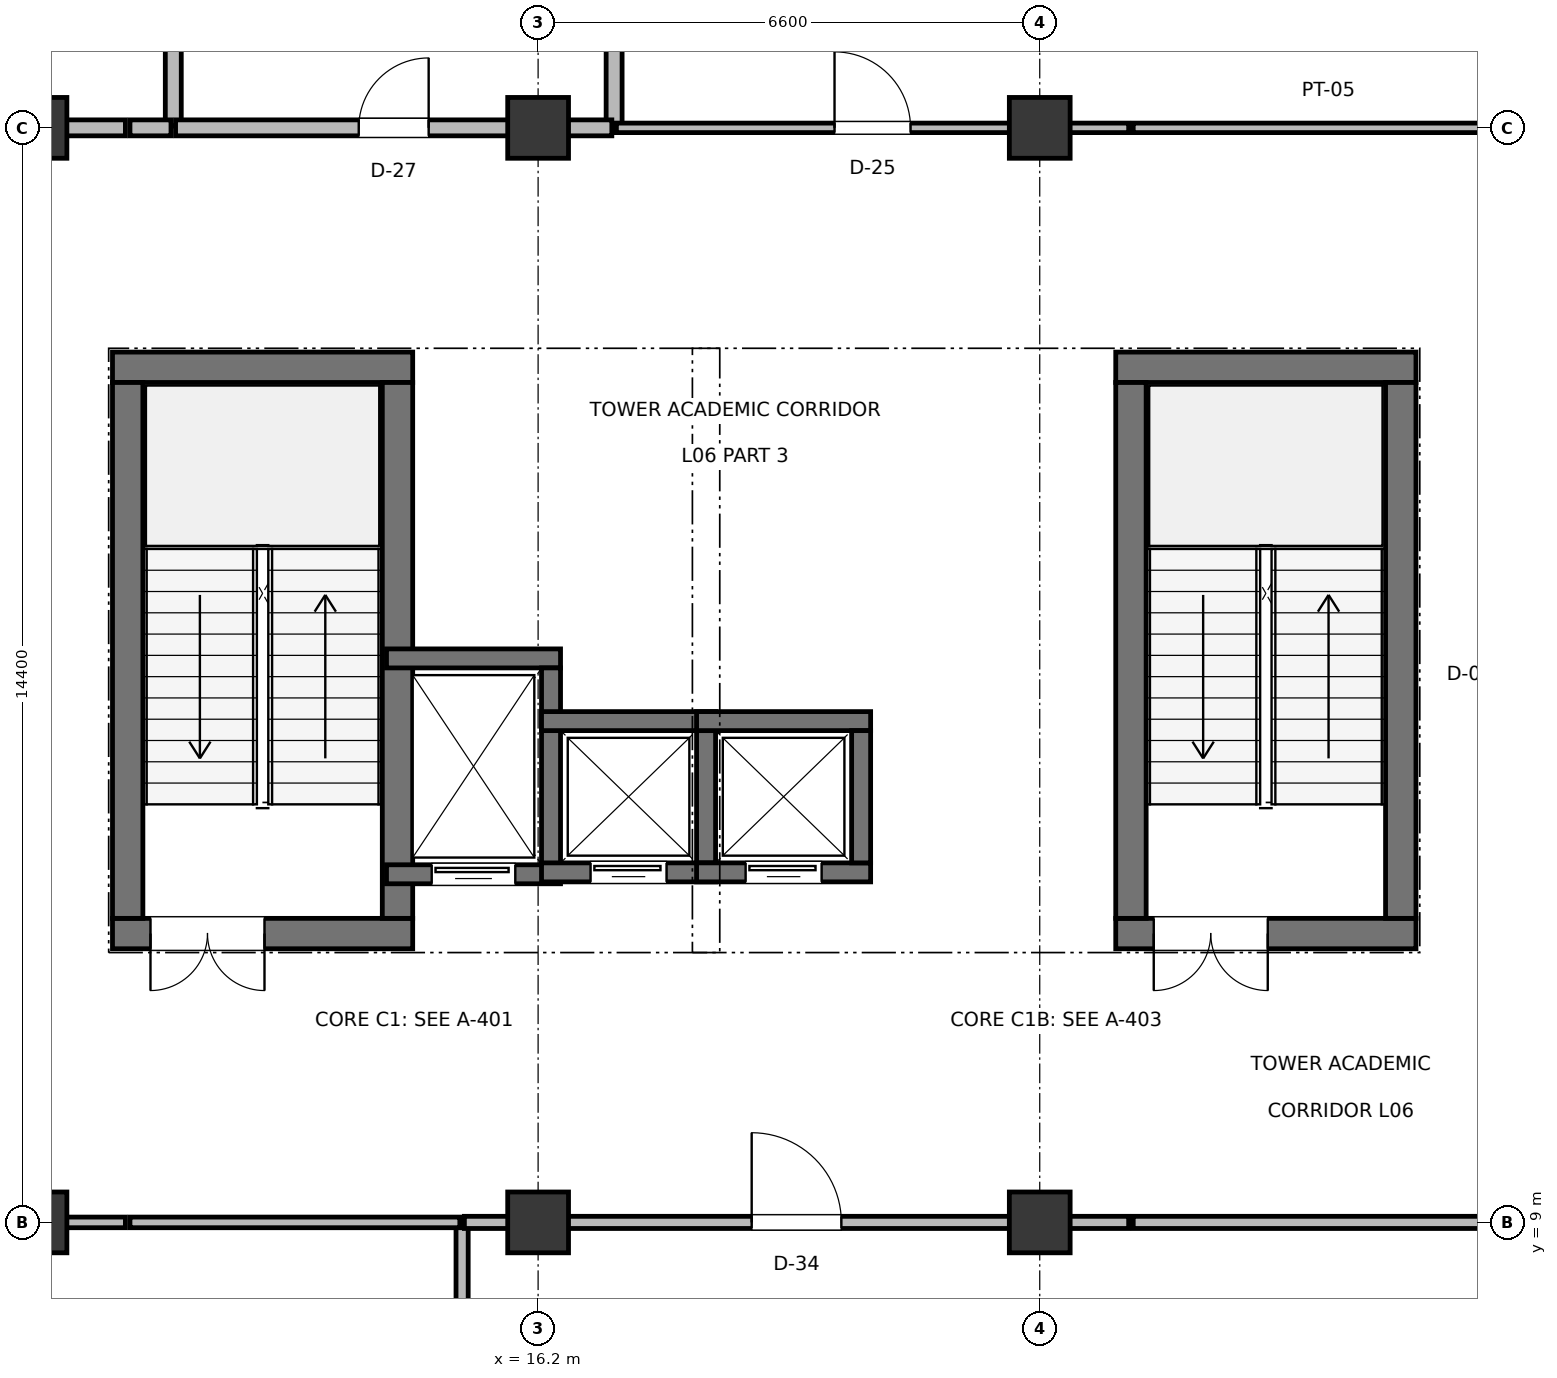
"""IFC4 building model, lengths in metres.
Left out: names, types, materials, properties, quantities, classifications, styles, units other than length and angle.
Written with IfcOpenShell. Run it as: python <this file> out.ifc"""

import sys

from ifc_helpers import new_model, si_unit, direction, frame, frame_2d, origin, origin_2d, place, context, subcontext, project, spatial, rectangle, extrude, element, fill, save


model = new_model("IFC4")
c1 = context("Model", 3, precision=1e-05, world=origin(), true_north=direction((0.0, 1.0)))
c2 = subcontext(c1, "Body", "Model", "MODEL_VIEW")
j1 = project(units=[si_unit("LENGTHUNIT", "METRE"), si_unit("PLANEANGLEUNIT", "RADIAN")], contexts=[c1])
p1 = place(None, origin())
s1 = spatial("IfcSite", under=j1, at=p1, CompositionType="ELEMENT")
p2 = place(p1, origin())
s2 = spatial("IfcBuilding", under=s1, at=p2, CompositionType="ELEMENT")
p3 = place(p2, frame((0.0, 0.0, 28.5)))
s3 = spatial("IfcBuildingStorey", under=s2, at=p3, CompositionType="ELEMENT", Elevation=28.5)
for number, where, z_axis, x_axis in (
    (1, (9.6, 9.0, 0.0), (0.0, 0.0, 1.0), (1.0, 0.0, 0.0)),
    (2, (9.6, 23.4, 0.0), (0.0, 0.0, 1.0), (1.0, 0.0, 0.0)),
    (3, (16.2, 9.0, 0.0), (0.0, 0.0, 1.0), (1.0, 0.0, 0.0)),
    (4, (16.2, 23.4, 0.0), (0.0, 0.0, 1.0), (1.0, 0.0, 0.0)),
    (5, (22.8, 9.0, 0.0), (0.0, 0.0, 1.0), (1.0, 0.0, 0.0)),
    (6, (22.8, 23.4, 0.0), (0.0, 0.0, 1.0), (1.0, 0.0, 0.0)),
):
    element("IfcColumn", number, at=place(p3, frame(where, z_axis=z_axis, x_axis=x_axis)), inside=s3, PredefinedType="COLUMN", context=c2, shape_type="SweptSolid", body=[
        extrude(rectangle(XDim=0.8, YDim=0.8, at=origin_2d()), origin(), (0.0, 0.0, 1.0), 4.5),
    ])
p4 = place(p3, frame((10.6, 12.8, 0.0), z_axis=(0.0, 0.0, 1.0), x_axis=(1.0, 0.0, 0.0)))
e7 = element("IfcWall", 7, at=p4, inside=s3, PredefinedType="SHEAR", context=c2, shape_type="SweptSolid", body=[
    extrude(rectangle(XDim=3.95, YDim=0.4, at=frame_2d((1.975, 0.0))), origin(), (0.0, 0.0, 1.0), 4.28),
])
p5 = place(p4, frame((0.5, 0.0, 0.0)))
e8 = element("IfcOpeningElement", 8, at=p5, cuts=e7, PredefinedType="OPENING", context=c2, shape_type="SweptSolid", body=[
    extrude(rectangle(XDim=1.5, YDim=2.2, at=frame_2d((0.75, 1.1))), frame((0.0, 0.21, 0.0), z_axis=(0.0, -1.0, 0.0), x_axis=(1.0, 0.0, 0.0)), (0.0, 0.0, 1.0), 0.42),
])
p6 = place(p3, frame((10.6, 20.25, 0.0), z_axis=(0.0, 0.0, 1.0), x_axis=(1.0, 0.0, 0.0)))
e9 = element("IfcWall", 9, at=p6, inside=s3, PredefinedType="SHEAR", context=c2, shape_type="SweptSolid", body=[
    extrude(rectangle(XDim=3.95, YDim=0.4, at=frame_2d((1.975, 0.0))), origin(), (0.0, 0.0, 1.0), 4.28),
])
for number, where, z_axis, x_axis in (
    (10, (10.8, 13.0, 0.0), (0.0, 0.0, 1.0), (0.0, 1.0, 0.0)),
    (11, (14.35, 13.0, 0.0), (0.0, 0.0, 1.0), (0.0, 1.0, 0.0)),
):
    element("IfcWall", number, at=place(p3, frame(where, z_axis=z_axis, x_axis=x_axis)), inside=s3, PredefinedType="SHEAR", context=c2, shape_type="SweptSolid", body=[
        extrude(rectangle(XDim=7.05, YDim=0.4, at=frame_2d((3.525, 0.0))), origin(), (0.0, 0.0, 1.0), 4.28),
    ])
p7 = place(p3, frame((14.205, 13.58, 0.0), z_axis=(0.0, 0.0, 1.0), x_axis=(1.0, 0.0, 0.0)))
e12 = element("IfcWall", 12, at=p7, inside=s3, PredefinedType="SHEAR", context=c2, shape_type="SweptSolid", body=[
    extrude(rectangle(XDim=2.29, YDim=0.25, at=frame_2d((1.145, 0.0))), origin(), (0.0, 0.0, 1.0), 4.26),
])
p8 = place(p7, frame((0.595, 0.0, 0.0)))
e13 = element("IfcOpeningElement", 13, at=p8, cuts=e12, PredefinedType="OPENING", context=c2, shape_type="SweptSolid", body=[
    extrude(rectangle(XDim=1.1, YDim=2.2, at=frame_2d((0.55, 1.1))), frame((0.0, 0.135, 0.0), z_axis=(0.0, -1.0, 0.0), x_axis=(1.0, 0.0, 0.0)), (0.0, 0.0, 1.0), 0.27),
])
p9 = place(p3, frame((14.205, 16.42, 0.0), z_axis=(0.0, 0.0, 1.0), x_axis=(1.0, 0.0, 0.0)))
e14 = element("IfcWall", 14, at=p9, inside=s3, PredefinedType="SHEAR", context=c2, shape_type="SweptSolid", body=[
    extrude(rectangle(XDim=2.29, YDim=0.25, at=frame_2d((1.145, 0.0))), origin(), (0.0, 0.0, 1.0), 4.26),
])
p10 = place(p3, frame((16.37, 13.705, 0.0), z_axis=(0.0, 0.0, 1.0), x_axis=(0.0, 1.0, 0.0)))
e15 = element("IfcWall", 15, at=p10, inside=s3, PredefinedType="SHEAR", context=c2, shape_type="SweptSolid", body=[
    extrude(rectangle(XDim=2.59, YDim=0.25, at=frame_2d((1.295, 0.0))), origin(), (0.0, 0.0, 1.0), 4.26),
])
p11 = place(p3, frame((16.245, 13.605, 0.0), z_axis=(0.0, 0.0, 1.0), x_axis=(1.0, 0.0, 0.0)))
e16 = element("IfcWall", 16, at=p11, inside=s3, PredefinedType="SHEAR", context=c2, shape_type="SweptSolid", body=[
    extrude(rectangle(XDim=2.29, YDim=0.25, at=frame_2d((1.145, 0.0))), origin(), (0.0, 0.0, 1.0), 4.26),
])
p12 = place(p11, frame((0.645, 0.0, 0.0)))
e17 = element("IfcOpeningElement", 17, at=p12, cuts=e16, PredefinedType="OPENING", context=c2, shape_type="SweptSolid", body=[
    extrude(rectangle(XDim=1.0, YDim=2.15, at=frame_2d((0.5, 1.075))), frame((0.0, 0.135, 0.0), z_axis=(0.0, -1.0, 0.0), x_axis=(1.0, 0.0, 0.0)), (0.0, 0.0, 1.0), 0.27),
])
p13 = place(p3, frame((16.245, 15.595, 0.0), z_axis=(0.0, 0.0, 1.0), x_axis=(1.0, 0.0, 0.0)))
e18 = element("IfcWall", 18, at=p13, inside=s3, PredefinedType="SHEAR", context=c2, shape_type="SweptSolid", body=[
    extrude(rectangle(XDim=2.29, YDim=0.25, at=frame_2d((1.145, 0.0))), origin(), (0.0, 0.0, 1.0), 4.26),
])
p14 = place(p3, frame((18.41, 13.73, 0.0), z_axis=(0.0, 0.0, 1.0), x_axis=(0.0, 1.0, 0.0)))
e19 = element("IfcWall", 19, at=p14, inside=s3, PredefinedType="SHEAR", context=c2, shape_type="SweptSolid", body=[
    extrude(rectangle(XDim=1.74, YDim=0.25, at=frame_2d((0.87, 0.0))), origin(), (0.0, 0.0, 1.0), 4.26),
])
p15 = place(p3, frame((23.8, 12.8, 0.0), z_axis=(0.0, 0.0, 1.0), x_axis=(1.0, 0.0, 0.0)))
e20 = element("IfcWall", 20, at=p15, inside=s3, PredefinedType="SHEAR", context=c2, shape_type="SweptSolid", body=[
    extrude(rectangle(XDim=3.95, YDim=0.4, at=frame_2d((1.975, 0.0))), origin(), (0.0, 0.0, 1.0), 4.28),
])
p16 = place(p15, frame((0.5, 0.0, 0.0)))
e21 = element("IfcOpeningElement", 21, at=p16, cuts=e20, PredefinedType="OPENING", context=c2, shape_type="SweptSolid", body=[
    extrude(rectangle(XDim=1.5, YDim=2.2, at=frame_2d((0.75, 1.1))), frame((0.0, 0.21, 0.0), z_axis=(0.0, -1.0, 0.0), x_axis=(1.0, 0.0, 0.0)), (0.0, 0.0, 1.0), 0.42),
])
p17 = place(p3, frame((23.8, 20.25, 0.0), z_axis=(0.0, 0.0, 1.0), x_axis=(1.0, 0.0, 0.0)))
e22 = element("IfcWall", 22, at=p17, inside=s3, PredefinedType="SHEAR", context=c2, shape_type="SweptSolid", body=[
    extrude(rectangle(XDim=3.95, YDim=0.4, at=frame_2d((1.975, 0.0))), origin(), (0.0, 0.0, 1.0), 4.28),
])
for number, where, z_axis, x_axis in (
    (23, (24.0, 13.0, 0.0), (0.0, 0.0, 1.0), (0.0, 1.0, 0.0)),
    (24, (27.55, 13.0, 0.0), (0.0, 0.0, 1.0), (0.0, 1.0, 0.0)),
):
    element("IfcWall", number, at=place(p3, frame(where, z_axis=z_axis, x_axis=x_axis)), inside=s3, PredefinedType="SHEAR", context=c2, shape_type="SweptSolid", body=[
        extrude(rectangle(XDim=7.05, YDim=0.4, at=frame_2d((3.525, 0.0))), origin(), (0.0, 0.0, 1.0), 4.28),
    ])
p18 = place(p3, frame((18.285, 13.605, 0.0), z_axis=(0.0, 0.0, 1.0), x_axis=(1.0, 0.0, 0.0)))
e25 = element("IfcWall", 25, at=p18, inside=s3, PredefinedType="SHEAR", context=c2, shape_type="SweptSolid", body=[
    extrude(rectangle(XDim=2.29, YDim=0.25, at=frame_2d((1.145, 0.0))), origin(), (0.0, 0.0, 1.0), 4.26),
])
p19 = place(p18, frame((0.645, 0.0, 0.0)))
e26 = element("IfcOpeningElement", 26, at=p19, cuts=e25, PredefinedType="OPENING", context=c2, shape_type="SweptSolid", body=[
    extrude(rectangle(XDim=1.0, YDim=2.15, at=frame_2d((0.5, 1.075))), frame((0.0, 0.135, 0.0), z_axis=(0.0, -1.0, 0.0), x_axis=(1.0, 0.0, 0.0)), (0.0, 0.0, 1.0), 0.27),
])
p20 = place(p3, frame((18.285, 15.595, 0.0), z_axis=(0.0, 0.0, 1.0), x_axis=(1.0, 0.0, 0.0)))
e27 = element("IfcWall", 27, at=p20, inside=s3, PredefinedType="SHEAR", context=c2, shape_type="SweptSolid", body=[
    extrude(rectangle(XDim=2.29, YDim=0.25, at=frame_2d((1.145, 0.0))), origin(), (0.0, 0.0, 1.0), 4.26),
])
p21 = place(p3, frame((20.45, 13.73, 0.0), z_axis=(0.0, 0.0, 1.0), x_axis=(0.0, 1.0, 0.0)))
e28 = element("IfcWall", 28, at=p21, inside=s3, PredefinedType="SHEAR", context=c2, shape_type="SweptSolid", body=[
    extrude(rectangle(XDim=1.74, YDim=0.25, at=frame_2d((0.87, 0.0))), origin(), (0.0, 0.0, 1.0), 4.26),
])
p22 = place(p3, frame((15.2, 3.23, 0.0), z_axis=(0.0, 0.0, 1.0), x_axis=(0.0, 1.0, 0.0)))
e29 = element("IfcWall", 29, at=p22, inside=s3, PredefinedType="PARTITIONING", context=c2, shape_type="SweptSolid", body=[
    extrude(rectangle(XDim=5.74, YDim=0.16, at=frame_2d((2.87, 0.0))), origin(), (0.0, 0.0, 1.0), 3.525),
])
p23 = place(p3, frame((3.23, 9.0, 0.0), z_axis=(0.0, 0.0, 1.0), x_axis=(1.0, 0.0, 0.0)))
e30 = element("IfcWall", 30, at=p23, inside=s3, PredefinedType="PARTITIONING", context=c2, shape_type="SweptSolid", body=[
    extrude(rectangle(XDim=7.54, YDim=0.14, at=frame_2d((3.77, 0.0))), origin(), (0.0, 0.0, 1.0), 3.415),
])
p24 = place(p23, frame((3.195, 0.0, 0.0)))
e31 = element("IfcOpeningElement", 31, at=p24, cuts=e30, PredefinedType="OPENING", context=c2, shape_type="SweptSolid", body=[
    extrude(rectangle(XDim=1.15, YDim=2.15, at=frame_2d((0.575, 1.075))), frame((0.0, 0.08, 0.0), z_axis=(0.0, -1.0, 0.0), x_axis=(1.0, 0.0, 0.0)), (0.0, 0.0, 1.0), 0.16),
])
p25 = place(p3, frame((10.83, 9.0, 0.0), z_axis=(0.0, 0.0, 1.0), x_axis=(1.0, 0.0, 0.0)))
e32 = element("IfcWall", 32, at=p25, inside=s3, PredefinedType="PARTITIONING", context=c2, shape_type="SweptSolid", body=[
    extrude(rectangle(XDim=4.34, YDim=0.14, at=frame_2d((2.17, 0.0))), origin(), (0.0, 0.0, 1.0), 3.525),
])
p26 = place(p3, frame((24.03, 9.0, 0.0), z_axis=(0.0, 0.0, 1.0), x_axis=(1.0, 0.0, 0.0)))
e33 = element("IfcWall", 33, at=p26, inside=s3, PredefinedType="PARTITIONING", context=c2, shape_type="SweptSolid", body=[
    extrude(rectangle(XDim=5.14, YDim=0.16, at=frame_2d((2.57, 0.0))), origin(), (0.0, 0.0, 1.0), 3.525),
])
p27 = place(p3, frame((15.23, 9.0, 0.0), z_axis=(0.0, 0.0, 1.0), x_axis=(1.0, 0.0, 0.0)))
e34 = element("IfcWall", 34, at=p27, inside=s3, PredefinedType="PARTITIONING", context=c2, shape_type="SweptSolid", body=[
    extrude(rectangle(XDim=8.74, YDim=0.16, at=frame_2d((4.37, 0.0))), origin(), (0.0, 0.0, 1.0), 3.355),
])
p28 = place(p27, frame((3.78, 0.0, 0.0)))
e35 = element("IfcOpeningElement", 35, at=p28, cuts=e34, PredefinedType="OPENING", context=c2, shape_type="SweptSolid", body=[
    extrude(rectangle(XDim=1.18, YDim=2.2, at=frame_2d((0.59, 1.1))), frame((0.0, 0.09, 0.0), z_axis=(0.0, -1.0, 0.0), x_axis=(1.0, 0.0, 0.0)), (0.0, 0.0, 1.0), 0.18),
])
p29 = place(p3, frame((11.4, 23.43, 0.0), z_axis=(0.0, 0.0, 1.0), x_axis=(0.0, 1.0, 0.0)))
e36 = element("IfcWall", 36, at=p29, inside=s3, PredefinedType="PLUMBINGWALL", context=c2, shape_type="SweptSolid", body=[
    extrude(rectangle(XDim=6.34, YDim=0.21, at=frame_2d((3.17, 0.0))), origin(), (0.0, 0.0, 1.0), 3.525),
])
p30 = place(p3, frame((6.63, 23.4, 0.0), z_axis=(0.0, 0.0, 1.0), x_axis=(1.0, 0.0, 0.0)))
e37 = element("IfcWall", 37, at=p30, inside=s3, PredefinedType="PLUMBINGWALL", context=c2, shape_type="SweptSolid", body=[
    extrude(rectangle(XDim=4.14, YDim=0.21, at=frame_2d((2.07, 0.0))), origin(), (0.0, 0.0, 1.0), 3.315),
])
p31 = place(p30, frame((1.43, 0.0, 0.0)))
e38 = element("IfcOpeningElement", 38, at=p31, cuts=e37, PredefinedType="OPENING", context=c2, shape_type="SweptSolid", body=[
    extrude(rectangle(XDim=0.92, YDim=2.1, at=frame_2d((0.46, 1.05))), frame((0.0, 0.115, 0.0), z_axis=(0.0, -1.0, 0.0), x_axis=(1.0, 0.0, 0.0)), (0.0, 0.0, 1.0), 0.23),
])
p32 = place(p3, frame((10.83, 23.4, 0.0), z_axis=(0.0, 0.0, 1.0), x_axis=(1.0, 0.0, 0.0)))
e39 = element("IfcWall", 39, at=p32, inside=s3, PredefinedType="PLUMBINGWALL", context=c2, shape_type="SweptSolid", body=[
    extrude(rectangle(XDim=0.54, YDim=0.21, at=frame_2d((0.27, 0.0))), origin(), (0.0, 0.0, 1.0), 3.525),
])
p33 = place(p3, frame((17.2, 23.43, 0.0), z_axis=(0.0, 0.0, 1.0), x_axis=(0.0, 1.0, 0.0)))
e40 = element("IfcWall", 40, at=p33, inside=s3, PredefinedType="PLUMBINGWALL", context=c2, shape_type="SweptSolid", body=[
    extrude(rectangle(XDim=6.34, YDim=0.21, at=frame_2d((3.17, 0.0))), origin(), (0.0, 0.0, 1.0), 3.255),
])
p34 = place(p3, frame((11.43, 23.4, 0.0), z_axis=(0.0, 0.0, 1.0), x_axis=(1.0, 0.0, 0.0)))
e41 = element("IfcWall", 41, at=p34, inside=s3, PredefinedType="PLUMBINGWALL", context=c2, shape_type="SweptSolid", body=[
    extrude(rectangle(XDim=5.74, YDim=0.21, at=frame_2d((2.87, 0.0))), origin(), (0.0, 0.0, 1.0), 3.295),
])
p35 = place(p34, frame((2.41, 0.0, 0.0)))
e42 = element("IfcOpeningElement", 42, at=p35, cuts=e41, PredefinedType="OPENING", context=c2, shape_type="SweptSolid", body=[
    extrude(rectangle(XDim=0.92, YDim=2.1, at=frame_2d((0.46, 1.05))), frame((0.0, 0.115, 0.0), z_axis=(0.0, -1.0, 0.0), x_axis=(1.0, 0.0, 0.0)), (0.0, 0.0, 1.0), 0.23),
])
p36 = place(p3, frame((24.03, 23.4, 0.0), z_axis=(0.0, 0.0, 1.0), x_axis=(1.0, 0.0, 0.0)))
e43 = element("IfcWall", 43, at=p36, inside=s3, PredefinedType="PARTITIONING", context=c2, shape_type="SweptSolid", body=[
    extrude(rectangle(XDim=5.14, YDim=0.125, at=frame_2d((2.57, 0.0))), origin(), (0.0, 0.0, 1.0), 3.525),
])
p37 = place(p3, frame((17.23, 23.4, 0.0), z_axis=(0.0, 0.0, 1.0), x_axis=(1.0, 0.0, 0.0)))
e44 = element("IfcWall", 44, at=p37, inside=s3, PredefinedType="PARTITIONING", context=c2, shape_type="SweptSolid", body=[
    extrude(rectangle(XDim=6.74, YDim=0.125, at=frame_2d((3.37, 0.0))), origin(), (0.0, 0.0, 1.0), 3.295),
])
p38 = place(p37, frame((2.87, 0.0, 0.0)))
e45 = element("IfcOpeningElement", 45, at=p38, cuts=e44, PredefinedType="OPENING", context=c2, shape_type="SweptSolid", body=[
    extrude(rectangle(XDim=1.0, YDim=2.15, at=frame_2d((0.5, 1.075))), frame((0.0, 0.073, 0.0), z_axis=(0.0, -1.0, 0.0), x_axis=(1.0, 0.0, 0.0)), (0.0, 0.0, 1.0), 0.145),
])
p39 = place(p5, frame((1.5, 0.0, 0.0), z_axis=(0.0, 0.0, 1.0), x_axis=(-1.0, 0.0, 0.0)))
e46 = element("IfcDoor", 46, at=p39, inside=s3, OperationType="DOUBLE_DOOR_SINGLE_SWING", PredefinedType="DOOR", context=c2, shape_type="SweptSolid", body=[
    extrude(rectangle(XDim=1.5, YDim=2.2, at=frame_2d((0.75, 1.1))), frame((0.0, 0.025, 0.0), z_axis=(0.0, -1.0, 0.0), x_axis=(1.0, 0.0, 0.0)), (0.0, 0.0, 1.0), 0.05),
])
fill(e8, e46)
p40 = place(p8, frame((1.1, 0.0, 0.0), z_axis=(0.0, 0.0, 1.0), x_axis=(-1.0, 0.0, 0.0)))
e47 = element("IfcDoor", 47, at=p40, inside=s3, OperationType="SLIDING_TO_LEFT", PredefinedType="DOOR", context=c2, shape_type="SweptSolid", body=[
    extrude(rectangle(XDim=1.1, YDim=2.2, at=frame_2d((0.55, 1.1))), frame((0.0, 0.025, 0.0), z_axis=(0.0, -1.0, 0.0), x_axis=(1.0, 0.0, 0.0)), (0.0, 0.0, 1.0), 0.05),
])
fill(e13, e47)
p41 = place(p12, frame((1.0, 0.0, 0.0), z_axis=(0.0, 0.0, 1.0), x_axis=(-1.0, 0.0, 0.0)))
e48 = element("IfcDoor", 48, at=p41, inside=s3, OperationType="SLIDING_TO_LEFT", PredefinedType="DOOR", context=c2, shape_type="SweptSolid", body=[
    extrude(rectangle(XDim=1.0, YDim=2.15, at=frame_2d((0.5, 1.075))), frame((0.0, 0.025, 0.0), z_axis=(0.0, -1.0, 0.0), x_axis=(1.0, 0.0, 0.0)), (0.0, 0.0, 1.0), 0.05),
])
fill(e17, e48)
p42 = place(p16, frame((1.5, 0.0, 0.0), z_axis=(0.0, 0.0, 1.0), x_axis=(-1.0, 0.0, 0.0)))
e49 = element("IfcDoor", 49, at=p42, inside=s3, OperationType="DOUBLE_DOOR_SINGLE_SWING", PredefinedType="DOOR", context=c2, shape_type="SweptSolid", body=[
    extrude(rectangle(XDim=1.5, YDim=2.2, at=frame_2d((0.75, 1.1))), frame((0.0, 0.025, 0.0), z_axis=(0.0, -1.0, 0.0), x_axis=(1.0, 0.0, 0.0)), (0.0, 0.0, 1.0), 0.05),
])
fill(e21, e49)
p43 = place(p19, frame((1.0, 0.0, 0.0), z_axis=(0.0, 0.0, 1.0), x_axis=(-1.0, 0.0, 0.0)))
e50 = element("IfcDoor", 50, at=p43, inside=s3, OperationType="SLIDING_TO_LEFT", PredefinedType="DOOR", context=c2, shape_type="SweptSolid", body=[
    extrude(rectangle(XDim=1.0, YDim=2.15, at=frame_2d((0.5, 1.075))), frame((0.0, 0.025, 0.0), z_axis=(0.0, -1.0, 0.0), x_axis=(1.0, 0.0, 0.0)), (0.0, 0.0, 1.0), 0.05),
])
fill(e26, e50)
p44 = place(p28, origin())
e51 = element("IfcDoor", 51, at=p44, inside=s3, OperationType="SINGLE_SWING_LEFT", PredefinedType="DOOR", context=c2, shape_type="SweptSolid", body=[
    extrude(rectangle(XDim=1.18, YDim=2.2, at=frame_2d((0.59, 1.1))), frame((0.0, 0.025, 0.0), z_axis=(0.0, -1.0, 0.0), x_axis=(1.0, 0.0, 0.0)), (0.0, 0.0, 1.0), 0.05),
])
fill(e35, e51)
p45 = place(p35, origin())
e52 = element("IfcDoor", 52, at=p45, inside=s3, OperationType="SINGLE_SWING_RIGHT", PredefinedType="DOOR", context=c2, shape_type="SweptSolid", body=[
    extrude(rectangle(XDim=0.92, YDim=2.1, at=frame_2d((0.46, 1.05))), frame((0.0, 0.025, 0.0), z_axis=(0.0, -1.0, 0.0), x_axis=(1.0, 0.0, 0.0)), (0.0, 0.0, 1.0), 0.05),
])
fill(e42, e52)
p46 = place(p38, origin())
e53 = element("IfcDoor", 53, at=p46, inside=s3, OperationType="SINGLE_SWING_LEFT", PredefinedType="DOOR", context=c2, shape_type="SweptSolid", body=[
    extrude(rectangle(XDim=1.0, YDim=2.15, at=frame_2d((0.5, 1.075))), frame((0.0, 0.025, 0.0), z_axis=(0.0, -1.0, 0.0), x_axis=(1.0, 0.0, 0.0)), (0.0, 0.0, 1.0), 0.05),
])
fill(e45, e53)
save(model, sys.argv[1])
